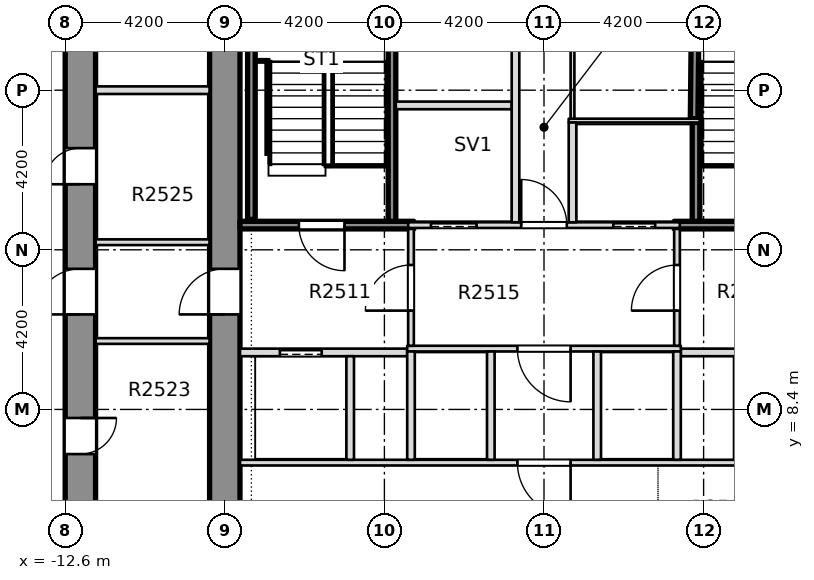
"""IFC4 building model, lengths in metres.
Left out: names, types, materials, properties, quantities, classifications, styles, units other than length and angle.
Written with IfcOpenShell. Run it as: python <this file> out.ifc"""

import sys

from ifc_helpers import new_model, si_unit, direction, frame, frame_2d, origin, place, context, subcontext, project, spatial, rectangle, extrude, element, fill, save


model = new_model("IFC4")
c1 = context("Model", 3, precision=1e-05, world=origin(), true_north=direction((0.0, 1.0)))
c2 = subcontext(c1, "Body", "Model", "MODEL_VIEW")
j1 = project(units=[si_unit("LENGTHUNIT", "METRE"), si_unit("PLANEANGLEUNIT", "RADIAN")], contexts=[c1])
p1 = place(None, origin())
s1 = spatial("IfcSite", under=j1, at=p1, CompositionType="ELEMENT")
p2 = place(p1, origin())
s2 = spatial("IfcBuilding", under=s1, at=p2, CompositionType="ELEMENT")
p3 = place(p2, frame((0.0, 0.0, 101.1)))
s3 = spatial("IfcBuildingStorey", under=s2, at=p3, CompositionType="ELEMENT", Elevation=101.1)
p4 = place(p3, frame((-12.2, -8.4, -0.32), z_axis=(0.0, 0.0, 1.0), x_axis=(0.0, 1.0, 0.0)))
e1 = element("IfcWall", 1, at=p4, inside=s3, PredefinedType="SHEAR", context=c2, shape_type="SweptSolid", body=[
    extrude(rectangle(XDim=30.15, YDim=0.8, at=frame_2d((15.075, 0.0))), origin(), (0.0, 0.0, 1.0), 3.45),
])
p5 = place(p4, frame((3.425, 0.0, 0.32)))
e2 = element("IfcOpeningElement", 2, at=p5, cuts=e1, PredefinedType="OPENING", context=c2, shape_type="SweptSolid", body=[
    extrude(rectangle(XDim=0.95, YDim=2.1, at=frame_2d((0.475, 1.05))), frame((0.0, 0.41, 0.0), z_axis=(0.0, -1.0, 0.0), x_axis=(1.0, 0.0, 0.0)), (0.0, 0.0, 1.0), 0.82),
])
p6 = place(p4, frame((8.075, 0.0, 0.32)))
e3 = element("IfcOpeningElement", 3, at=p6, cuts=e1, PredefinedType="OPENING", context=c2, shape_type="SweptSolid", body=[
    extrude(rectangle(XDim=0.95, YDim=2.1, at=frame_2d((0.475, 1.05))), frame((0.0, 0.41, 0.0), z_axis=(0.0, -1.0, 0.0), x_axis=(1.0, 0.0, 0.0)), (0.0, 0.0, 1.0), 0.82),
])
p7 = place(p4, frame((11.425, 0.0, 0.32)))
e4 = element("IfcOpeningElement", 4, at=p7, cuts=e1, PredefinedType="OPENING", context=c2, shape_type="SweptSolid", body=[
    extrude(rectangle(XDim=0.95, YDim=2.1, at=frame_2d((0.475, 1.05))), frame((0.0, 0.41, 0.0), z_axis=(0.0, -1.0, 0.0), x_axis=(1.0, 0.0, 0.0)), (0.0, 0.0, 1.0), 0.82),
])
p8 = place(p4, frame((15.625, 0.0, 0.32)))
e5 = element("IfcOpeningElement", 5, at=p8, cuts=e1, PredefinedType="OPENING", context=c2, shape_type="SweptSolid", body=[
    extrude(rectangle(XDim=0.95, YDim=2.1, at=frame_2d((0.475, 1.05))), frame((0.0, 0.41, 0.0), z_axis=(0.0, -1.0, 0.0), x_axis=(1.0, 0.0, 0.0)), (0.0, 0.0, 1.0), 0.82),
])
p9 = place(p4, frame((22.725, 0.0, 0.32)))
e6 = element("IfcOpeningElement", 6, at=p9, cuts=e1, PredefinedType="OPENING", context=c2, shape_type="SweptSolid", body=[
    extrude(rectangle(XDim=0.95, YDim=2.1, at=frame_2d((0.475, 1.05))), frame((0.0, 0.41, 0.0), z_axis=(0.0, -1.0, 0.0), x_axis=(1.0, 0.0, 0.0)), (0.0, 0.0, 1.0), 0.82),
])
p10 = place(p4, frame((26.75, 0.0, 0.32)))
e7 = element("IfcOpeningElement", 7, at=p10, cuts=e1, PredefinedType="OPENING", context=c2, shape_type="SweptSolid", body=[
    extrude(rectangle(XDim=0.95, YDim=2.1, at=frame_2d((0.475, 1.05))), frame((0.0, 0.41, 0.0), z_axis=(0.0, -1.0, 0.0), x_axis=(1.0, 0.0, 0.0)), (0.0, 0.0, 1.0), 0.82),
])
p11 = place(p4, frame((19.3, 0.0, 0.32)))
e8 = element("IfcOpeningElement", 8, at=p11, cuts=e1, PredefinedType="OPENING", context=c2, shape_type="SweptSolid", body=[
    extrude(rectangle(XDim=1.2, YDim=2.1, at=frame_2d((0.6, 1.05))), frame((0.0, 0.41, 0.0), z_axis=(0.0, -1.0, 0.0), x_axis=(1.0, 0.0, 0.0)), (0.0, 0.0, 1.0), 0.82),
])
p12 = place(p3, frame((-8.4, -7.6, -0.32), z_axis=(0.0, 0.0, 1.0), x_axis=(0.0, 1.0, 0.0)))
e9 = element("IfcWall", 9, at=p12, inside=s3, PredefinedType="SHEAR", context=c2, shape_type="SweptSolid", body=[
    extrude(rectangle(XDim=28.55, YDim=0.8, at=frame_2d((14.275, 0.0))), origin(), (0.0, 0.0, 1.0), 3.45),
])
p13 = place(p12, frame((18.5, 0.0, 0.32)))
e10 = element("IfcOpeningElement", 10, at=p13, cuts=e9, PredefinedType="OPENING", context=c2, shape_type="SweptSolid", body=[
    extrude(rectangle(XDim=1.2, YDim=2.1, at=frame_2d((0.6, 1.05))), frame((0.0, 0.41, 0.0), z_axis=(0.0, -1.0, 0.0), x_axis=(1.0, 0.0, 0.0)), (0.0, 0.0, 1.0), 0.82),
])
p14 = place(p3, frame((-7.999, 7.0, 0.0), z_axis=(0.0, 0.0, 1.0), x_axis=(1.0, 0.0, 0.0)))
e11 = element("IfcWall", 11, at=p14, inside=s3, PredefinedType="PARTITIONING", context=c2, shape_type="SweptSolid", body=[
    extrude(rectangle(XDim=15.998, YDim=0.15, at=frame_2d((7.999, 0.0))), origin(), (0.0, 0.0, 1.0), 3.13),
])
p15 = place(p14, frame((7.299, 0.0, 0.0)))
e12 = element("IfcOpeningElement", 12, at=p15, cuts=e11, PredefinedType="OPENING", context=c2, shape_type="SweptSolid", body=[
    extrude(rectangle(XDim=1.4, YDim=2.1, at=frame_2d((0.7, 1.05))), frame((0.0, 0.085, 0.0), z_axis=(0.0, -1.0, 0.0), x_axis=(1.0, 0.0, 0.0)), (0.0, 0.0, 1.0), 0.17),
])
p16 = place(p3, frame((-7.999, 9.9, 0.0), z_axis=(0.0, 0.0, 1.0), x_axis=(1.0, 0.0, 0.0)))
e13 = element("IfcWall", 13, at=p16, inside=s3, PredefinedType="PARTITIONING", context=c2, shape_type="SweptSolid", body=[
    extrude(rectangle(XDim=4.399, YDim=0.2, at=frame_2d((2.199, 0.0))), origin(), (0.0, 0.0, 1.0), 3.13),
])
p17 = place(p16, frame((1.049, 0.0, 0.0)))
e14 = element("IfcOpeningElement", 14, at=p17, cuts=e13, PredefinedType="OPENING", context=c2, shape_type="SweptSolid", body=[
    extrude(rectangle(XDim=1.1, YDim=2.1, at=frame_2d((0.55, 1.05))), frame((0.0, 0.11, 0.0), z_axis=(0.0, -1.0, 0.0), x_axis=(1.0, 0.0, 0.0)), (0.0, 0.0, 1.0), 0.22),
])
p18 = place(p3, frame((3.6, 9.9, 0.0), z_axis=(0.0, 0.0, 1.0), x_axis=(1.0, 0.0, 0.0)))
e15 = element("IfcWall", 15, at=p18, inside=s3, PredefinedType="PARTITIONING", context=c2, shape_type="SweptSolid", body=[
    extrude(rectangle(XDim=4.399, YDim=0.2, at=frame_2d((2.199, 0.0))), origin(), (0.0, 0.0, 1.0), 3.13),
])
p19 = place(p18, frame((2.25, 0.0, 0.0)))
e16 = element("IfcOpeningElement", 16, at=p19, cuts=e15, PredefinedType="OPENING", context=c2, shape_type="SweptSolid", body=[
    extrude(rectangle(XDim=1.1, YDim=2.1, at=frame_2d((0.55, 1.05))), frame((0.0, 0.11, 0.0), z_axis=(0.0, -1.0, 0.0), x_axis=(1.0, 0.0, 0.0)), (0.0, 0.0, 1.0), 0.22),
])
p20 = place(p3, frame((-3.6, 10.0, 0.0), z_axis=(0.0, 0.0, 1.0), x_axis=(1.0, 0.0, 0.0)))
e17 = element("IfcWall", 17, at=p20, inside=s3, PredefinedType="PARTITIONING", context=c2, shape_type="SweptSolid", body=[
    extrude(rectangle(XDim=7.2, YDim=0.15, at=frame_2d((3.6, 0.0))), origin(), (0.0, 0.0, 1.0), 3.13),
])
p21 = place(p20, frame((2.9, 0.0, 0.0)))
e18 = element("IfcOpeningElement", 18, at=p21, cuts=e17, PredefinedType="OPENING", context=c2, shape_type="SweptSolid", body=[
    extrude(rectangle(XDim=1.4, YDim=2.1, at=frame_2d((0.7, 1.05))), frame((0.0, 0.085, 0.0), z_axis=(0.0, -1.0, 0.0), x_axis=(1.0, 0.0, 0.0)), (0.0, 0.0, 1.0), 0.17),
])
p22 = place(p3, frame((-7.999, 13.25, 0.0), z_axis=(0.0, 0.0, 1.0), x_axis=(1.0, 0.0, 0.0)))
e19 = element("IfcWall", 19, at=p22, inside=s3, PredefinedType="SOLIDWALL", context=c2, shape_type="SweptSolid", body=[
    extrude(rectangle(XDim=4.574, YDim=0.2, at=frame_2d((2.287, 0.0))), origin(), (0.0, 0.0, 1.0), 3.13),
])
p23 = place(p22, frame((1.549, 0.0, 0.0)))
e20 = element("IfcOpeningElement", 20, at=p23, cuts=e19, PredefinedType="OPENING", context=c2, shape_type="SweptSolid", body=[
    extrude(rectangle(XDim=1.2, YDim=2.1, at=frame_2d((0.6, 1.05))), frame((0.0, 0.11, 0.0), z_axis=(0.0, -1.0, 0.0), x_axis=(1.0, 0.0, 0.0)), (0.0, 0.0, 1.0), 0.22),
])
p24 = place(p3, frame((-3.575, 13.25, 0.0), z_axis=(0.0, 0.0, 1.0), x_axis=(1.0, 0.0, 0.0)))
e21 = element("IfcWall", 21, at=p24, inside=s3, PredefinedType="PARTITIONING", context=c2, shape_type="SweptSolid", body=[
    extrude(rectangle(XDim=7.15, YDim=0.15, at=frame_2d((3.575, 0.0))), origin(), (0.0, 0.0, 1.0), 3.13),
])
p25 = place(p24, frame((0.6, 0.0, 0.0)))
e22 = element("IfcOpeningElement", 22, at=p25, cuts=e21, PredefinedType="OPENING", context=c2, shape_type="SweptSolid", body=[
    extrude(rectangle(XDim=1.2, YDim=2.1, at=frame_2d((0.6, 1.05))), frame((0.0, 0.085, 0.0), z_axis=(0.0, -1.0, 0.0), x_axis=(1.0, 0.0, 0.0)), (0.0, 0.0, 1.0), 0.17),
])
p26 = place(p24, frame((5.4, 0.0, 0.0)))
e23 = element("IfcOpeningElement", 23, at=p26, cuts=e21, PredefinedType="OPENING", context=c2, shape_type="SweptSolid", body=[
    extrude(rectangle(XDim=1.1, YDim=2.1, at=frame_2d((0.55, 1.05))), frame((0.0, 0.085, 0.0), z_axis=(0.0, -1.0, 0.0), x_axis=(1.0, 0.0, 0.0)), (0.0, 0.0, 1.0), 0.17),
])
p27 = place(p24, frame((2.975, 0.0, 0.0)))
e24 = element("IfcOpeningElement", 24, at=p27, cuts=e21, PredefinedType="OPENING", context=c2, shape_type="SweptSolid", body=[
    extrude(rectangle(XDim=1.2, YDim=2.1, at=frame_2d((0.6, 1.05))), frame((0.0, 0.085, 0.0), z_axis=(0.0, -1.0, 0.0), x_axis=(1.0, 0.0, 0.0)), (0.0, 0.0, 1.0), 0.17),
])
p28 = place(p3, frame((3.425, 13.25, 0.0), z_axis=(0.0, 0.0, 1.0), x_axis=(1.0, 0.0, 0.0)))
e25 = element("IfcWall", 25, at=p28, inside=s3, PredefinedType="SOLIDWALL", context=c2, shape_type="SweptSolid", body=[
    extrude(rectangle(XDim=4.574, YDim=0.2, at=frame_2d((2.287, 0.0))), origin(), (0.0, 0.0, 1.0), 3.13),
])
p29 = place(p28, frame((1.825, 0.0, 0.0)))
e26 = element("IfcOpeningElement", 26, at=p29, cuts=e25, PredefinedType="OPENING", context=c2, shape_type="SweptSolid", body=[
    extrude(rectangle(XDim=1.2, YDim=2.1, at=frame_2d((0.6, 1.05))), frame((0.0, 0.11, 0.0), z_axis=(0.0, -1.0, 0.0), x_axis=(1.0, 0.0, 0.0)), (0.0, 0.0, 1.0), 0.22),
])
p30 = place(p3, frame((0.65, 16.0, 0.0), z_axis=(0.0, 0.0, 1.0), x_axis=(1.0, 0.0, 0.0)))
e27 = element("IfcWall", 27, at=p30, inside=s3, PredefinedType="PARTITIONING", context=c2, shape_type="SweptSolid", body=[
    extrude(rectangle(XDim=3.45, YDim=0.1, at=frame_2d((1.725, 0.0))), origin(), (0.0, 0.0, 1.0), 3.13),
])
p31 = place(p3, frame((-3.9, 16.4, 0.0), z_axis=(0.0, 0.0, 1.0), x_axis=(1.0, 0.0, 0.0)))
e28 = element("IfcWall", 28, at=p31, inside=s3, PredefinedType="PARTITIONING", context=c2, shape_type="SweptSolid", body=[
    extrude(rectangle(XDim=3.05, YDim=0.2, at=frame_2d((1.525, 0.0))), origin(), (0.0, 0.0, 1.0), 3.13),
])
p32 = place(p3, frame((-5.1, 7.075, 0.0), z_axis=(0.0, 0.0, 1.0), x_axis=(0.0, 1.0, 0.0)))
e29 = element("IfcWall", 29, at=p32, inside=s3, PredefinedType="PARTITIONING", context=c2, shape_type="SweptSolid", body=[
    extrude(rectangle(XDim=2.725, YDim=0.2, at=frame_2d((1.363, 0.0))), origin(), (0.0, 0.0, 1.0), 3.13),
])
p33 = place(p3, frame((-4.0, 13.35, 0.0), z_axis=(0.0, 0.0, 1.0), x_axis=(0.0, 1.0, 0.0)))
e30 = element("IfcWall", 30, at=p33, inside=s3, PredefinedType="SOLIDWALL", context=c2, shape_type="SweptSolid", body=[
    extrude(rectangle(XDim=7.599, YDim=0.2, at=frame_2d((3.799, 0.0))), origin(), (0.0, 0.0, 1.0), 3.13),
])
p34 = place(p3, frame((-3.5, 7.075, 0.0), z_axis=(0.0, 0.0, 1.0), x_axis=(0.0, 1.0, 0.0)))
e31 = element("IfcWall", 31, at=p34, inside=s3, PredefinedType="PARTITIONING", context=c2, shape_type="SweptSolid", body=[
    extrude(rectangle(XDim=2.85, YDim=0.2, at=frame_2d((1.425, 0.0))), origin(), (0.0, 0.0, 1.0), 3.13),
])
p35 = place(p3, frame((-3.5, 10.075, 0.0), z_axis=(0.0, 0.0, 1.0), x_axis=(0.0, 1.0, 0.0)))
e32 = element("IfcWall", 32, at=p35, inside=s3, PredefinedType="PARTITIONING", context=c2, shape_type="SweptSolid", body=[
    extrude(rectangle(XDim=3.075, YDim=0.15, at=frame_2d((1.538, 0.0))), origin(), (0.0, 0.0, 1.0), 3.13),
])
p36 = place(p35, frame((0.925, 0.0, 0.0)))
e33 = element("IfcOpeningElement", 33, at=p36, cuts=e32, PredefinedType="OPENING", context=c2, shape_type="SweptSolid", body=[
    extrude(rectangle(XDim=1.2, YDim=2.1, at=frame_2d((0.6, 1.05))), frame((0.0, 0.085, 0.0), z_axis=(0.0, -1.0, 0.0), x_axis=(1.0, 0.0, 0.0)), (0.0, 0.0, 1.0), 0.17),
])
p37 = place(p3, frame((-1.4, 7.075, 0.0), z_axis=(0.0, 0.0, 1.0), x_axis=(0.0, 1.0, 0.0)))
e34 = element("IfcWall", 34, at=p37, inside=s3, PredefinedType="PARTITIONING", context=c2, shape_type="SweptSolid", body=[
    extrude(rectangle(XDim=2.85, YDim=0.2, at=frame_2d((1.425, 0.0))), origin(), (0.0, 0.0, 1.0), 3.13),
])
p38 = place(p3, frame((-0.75, 13.325, 0.0), z_axis=(0.0, 0.0, 1.0), x_axis=(0.0, 1.0, 0.0)))
e35 = element("IfcWall", 35, at=p38, inside=s3, PredefinedType="PARTITIONING", context=c2, shape_type="SweptSolid", body=[
    extrude(rectangle(XDim=7.624, YDim=0.2, at=frame_2d((3.812, 0.0))), origin(), (0.0, 0.0, 1.0), 3.13),
])
p39 = place(p38, frame((4.8, 0.0, 0.0)))
e36 = element("IfcOpeningElement", 36, at=p39, cuts=e35, PredefinedType="OPENING", context=c2, shape_type="SweptSolid", body=[
    extrude(rectangle(XDim=0.95, YDim=2.1, at=frame_2d((0.475, 1.05))), frame((0.0, 0.11, 0.0), z_axis=(0.0, -1.0, 0.0), x_axis=(1.0, 0.0, 0.0)), (0.0, 0.0, 1.0), 0.22),
])
p40 = place(p3, frame((0.75, 13.325, 0.0), z_axis=(0.0, 0.0, 1.0), x_axis=(0.0, 1.0, 0.0)))
e37 = element("IfcWall", 37, at=p40, inside=s3, PredefinedType="PARTITIONING", context=c2, shape_type="SweptSolid", body=[
    extrude(rectangle(XDim=2.625, YDim=0.2, at=frame_2d((1.312, 0.0))), origin(), (0.0, 0.0, 1.0), 3.13),
])
p41 = place(p3, frame((0.75, 16.05, 0.0), z_axis=(0.0, 0.0, 1.0), x_axis=(0.0, 1.0, 0.0)))
e38 = element("IfcWall", 38, at=p41, inside=s3, PredefinedType="PARTITIONING", context=c2, shape_type="SweptSolid", body=[
    extrude(rectangle(XDim=4.899, YDim=0.1, at=frame_2d((2.449, 0.0))), origin(), (0.0, 0.0, 1.0), 3.13),
])
p42 = place(p41, frame((1.875, 0.0, 0.0)))
e39 = element("IfcOpeningElement", 39, at=p42, cuts=e38, PredefinedType="OPENING", context=c2, shape_type="SweptSolid", body=[
    extrude(rectangle(XDim=0.95, YDim=2.1, at=frame_2d((0.475, 1.05))), frame((0.0, 0.06, 0.0), z_axis=(0.0, -1.0, 0.0), x_axis=(1.0, 0.0, 0.0)), (0.0, 0.0, 1.0), 0.12),
])
for number, where, z_axis, x_axis in (
    (40, (1.4, 7.075, 0.0), (0.0, 0.0, 1.0), (0.0, 1.0, 0.0)),
    (41, (3.5, 7.075, 0.0), (0.0, 0.0, 1.0), (0.0, 1.0, 0.0)),
):
    element("IfcWall", number, at=place(p3, frame(where, z_axis=z_axis, x_axis=x_axis)), inside=s3, PredefinedType="PARTITIONING", context=c2, shape_type="SweptSolid", body=[
        extrude(rectangle(XDim=2.85, YDim=0.2, at=frame_2d((1.425, 0.0))), origin(), (0.0, 0.0, 1.0), 3.13),
    ])
p43 = place(p3, frame((3.5, 10.075, 0.0), z_axis=(0.0, 0.0, 1.0), x_axis=(0.0, 1.0, 0.0)))
e42 = element("IfcWall", 42, at=p43, inside=s3, PredefinedType="PARTITIONING", context=c2, shape_type="SweptSolid", body=[
    extrude(rectangle(XDim=3.075, YDim=0.15, at=frame_2d((1.538, 0.0))), origin(), (0.0, 0.0, 1.0), 3.13),
])
p44 = place(p43, frame((0.925, 0.0, 0.0)))
e43 = element("IfcOpeningElement", 43, at=p44, cuts=e42, PredefinedType="OPENING", context=c2, shape_type="SweptSolid", body=[
    extrude(rectangle(XDim=1.2, YDim=2.1, at=frame_2d((0.6, 1.05))), frame((0.0, 0.085, 0.0), z_axis=(0.0, -1.0, 0.0), x_axis=(1.0, 0.0, 0.0)), (0.0, 0.0, 1.0), 0.17),
])
p45 = place(p3, frame((4.0, 13.35, 0.0), z_axis=(0.0, 0.0, 1.0), x_axis=(0.0, 1.0, 0.0)))
e44 = element("IfcWall", 44, at=p45, inside=s3, PredefinedType="SOLIDWALL", context=c2, shape_type="SweptSolid", body=[
    extrude(rectangle(XDim=2.6, YDim=0.2, at=frame_2d((1.3, 0.0))), origin(), (0.0, 0.0, 1.0), 3.13),
])
p46 = place(p3, frame((3.95, 16.05, 0.0), z_axis=(0.0, 0.0, 1.0), x_axis=(0.01032118628, 0.999946735138, 0.0)))
e45 = element("IfcWall", 45, at=p46, inside=s3, PredefinedType="SOLIDWALL", context=c2, shape_type="SweptSolid", body=[
    extrude(rectangle(XDim=4.849, YDim=0.2, at=frame_2d((2.425, 0.0))), origin(), (0.0, 0.0, 1.0), 3.13),
])
for number, where, z_axis, x_axis in (
    (46, (-11.799, 10.2, 0.0), (0.0, 0.0, 1.0), (1.0, 0.0, 0.0)),
    (47, (-11.799, 12.8, 0.0), (0.0, 0.0, 1.0), (1.0, 0.0, 0.0)),
):
    element("IfcWall", number, at=place(p3, frame(where, z_axis=z_axis, x_axis=x_axis)), inside=s3, PredefinedType="PARTITIONING", context=c2, shape_type="SweptSolid", body=[
        extrude(rectangle(XDim=2.998, YDim=0.15, at=frame_2d((1.499, 0.0))), origin(), (0.0, 0.0, 1.0), 3.13),
    ])
p47 = place(p3, frame((-11.799, 16.8, 0.0), z_axis=(0.0, 0.0, 1.0), x_axis=(1.0, 0.0, 0.0)))
e48 = element("IfcWall", 48, at=p47, inside=s3, PredefinedType="PARTITIONING", context=c2, shape_type="SweptSolid", body=[
    extrude(rectangle(XDim=2.998, YDim=0.2, at=frame_2d((1.499, 0.0))), origin(), (0.0, 0.0, 1.0), 3.13),
])
p48 = place(p3, frame((-7.7, 13.4, 0.0), z_axis=(0.0, 0.0, 1.0), x_axis=(0.0, 1.0, 0.0)))
e49 = element("IfcWall", 49, at=p48, inside=s3, PredefinedType="SOLIDWALL", context=c2, shape_type="SweptSolid", body=[
    extrude(rectangle(XDim=7.45, YDim=0.2, at=frame_2d((3.725, 0.0))), origin(), (0.0, 0.0, 1.0), 3.13),
])
p49 = place(p23, origin())
e50 = element("IfcDoor", 50, at=p49, inside=s3, OperationType="SINGLE_SWING_LEFT", PredefinedType="DOOR", context=c2, shape_type="SweptSolid", body=[
    extrude(rectangle(XDim=1.2, YDim=2.1, at=frame_2d((0.6, 1.05))), frame((0.0, 0.025, 0.0), z_axis=(0.0, -1.0, 0.0), x_axis=(1.0, 0.0, 0.0)), (0.0, 0.0, 1.0), 0.05),
])
fill(e20, e50)
p50 = place(p17, origin())
e51 = element("IfcDoor", 51, at=p50, inside=s3, OperationType="SLIDING_TO_LEFT", PredefinedType="DOOR", context=c2, shape_type="SweptSolid", body=[
    extrude(rectangle(XDim=1.1, YDim=2.1, at=frame_2d((0.55, 1.05))), frame((0.0, 0.025, 0.0), z_axis=(0.0, -1.0, 0.0), x_axis=(1.0, 0.0, 0.0)), (0.0, 0.0, 1.0), 0.05),
])
fill(e14, e51)
p51 = place(p15, origin())
e52 = element("IfcDoor", 52, at=p51, inside=s3, OperationType="SINGLE_SWING_RIGHT", PredefinedType="DOOR", context=c2, shape_type="SweptSolid", body=[
    extrude(rectangle(XDim=1.4, YDim=2.1, at=frame_2d((0.7, 1.05))), frame((0.0, 0.025, 0.0), z_axis=(0.0, -1.0, 0.0), x_axis=(1.0, 0.0, 0.0)), (0.0, 0.0, 1.0), 0.05),
])
fill(e12, e52)
p52 = place(p21, origin())
e53 = element("IfcDoor", 53, at=p52, inside=s3, OperationType="SINGLE_SWING_RIGHT", PredefinedType="DOOR", context=c2, shape_type="SweptSolid", body=[
    extrude(rectangle(XDim=1.4, YDim=2.1, at=frame_2d((0.7, 1.05))), frame((0.0, 0.025, 0.0), z_axis=(0.0, -1.0, 0.0), x_axis=(1.0, 0.0, 0.0)), (0.0, 0.0, 1.0), 0.05),
])
fill(e18, e53)
p53 = place(p25, origin())
e54 = element("IfcDoor", 54, at=p53, inside=s3, OperationType="SLIDING_TO_RIGHT", PredefinedType="DOOR", context=c2, shape_type="SweptSolid", body=[
    extrude(rectangle(XDim=1.2, YDim=2.1, at=frame_2d((0.6, 1.05))), frame((0.0, 0.025, 0.0), z_axis=(0.0, -1.0, 0.0), x_axis=(1.0, 0.0, 0.0)), (0.0, 0.0, 1.0), 0.05),
])
fill(e22, e54)
p54 = place(p26, origin())
e55 = element("IfcDoor", 55, at=p54, inside=s3, OperationType="SLIDING_TO_LEFT", PredefinedType="DOOR", context=c2, shape_type="SweptSolid", body=[
    extrude(rectangle(XDim=1.1, YDim=2.1, at=frame_2d((0.55, 1.05))), frame((0.0, 0.025, 0.0), z_axis=(0.0, -1.0, 0.0), x_axis=(1.0, 0.0, 0.0)), (0.0, 0.0, 1.0), 0.05),
])
fill(e23, e55)
p55 = place(p27, origin())
e56 = element("IfcDoor", 56, at=p55, inside=s3, OperationType="SINGLE_SWING_RIGHT", PredefinedType="DOOR", context=c2, shape_type="SweptSolid", body=[
    extrude(rectangle(XDim=1.2, YDim=2.1, at=frame_2d((0.6, 1.05))), frame((0.0, 0.025, 0.0), z_axis=(0.0, -1.0, 0.0), x_axis=(1.0, 0.0, 0.0)), (0.0, 0.0, 1.0), 0.05),
])
fill(e24, e56)
p56 = place(p36, origin())
e57 = element("IfcDoor", 57, at=p56, inside=s3, OperationType="SINGLE_SWING_RIGHT", PredefinedType="DOOR", context=c2, shape_type="SweptSolid", body=[
    extrude(rectangle(XDim=1.2, YDim=2.1, at=frame_2d((0.6, 1.05))), frame((0.0, 0.025, 0.0), z_axis=(0.0, -1.0, 0.0), x_axis=(1.0, 0.0, 0.0)), (0.0, 0.0, 1.0), 0.05),
])
fill(e33, e57)
p57 = place(p44, origin())
e58 = element("IfcDoor", 58, at=p57, inside=s3, OperationType="SINGLE_SWING_LEFT", PredefinedType="DOOR", context=c2, shape_type="SweptSolid", body=[
    extrude(rectangle(XDim=1.2, YDim=2.1, at=frame_2d((0.6, 1.05))), frame((0.0, 0.025, 0.0), z_axis=(0.0, -1.0, 0.0), x_axis=(1.0, 0.0, 0.0)), (0.0, 0.0, 1.0), 0.05),
])
fill(e43, e58)
p58 = place(p8, origin())
e59 = element("IfcDoor", 59, at=p58, inside=s3, OperationType="SINGLE_SWING_LEFT", PredefinedType="DOOR", context=c2, shape_type="SweptSolid", body=[
    extrude(rectangle(XDim=0.95, YDim=2.1, at=frame_2d((0.475, 1.05))), frame((0.0, 0.025, 0.0), z_axis=(0.0, -1.0, 0.0), x_axis=(1.0, 0.0, 0.0)), (0.0, 0.0, 1.0), 0.05),
])
fill(e5, e59)
p59 = place(p9, origin())
e60 = element("IfcDoor", 60, at=p59, inside=s3, OperationType="SINGLE_SWING_LEFT", PredefinedType="DOOR", context=c2, shape_type="SweptSolid", body=[
    extrude(rectangle(XDim=0.95, YDim=2.1, at=frame_2d((0.475, 1.05))), frame((0.0, 0.025, 0.0), z_axis=(0.0, -1.0, 0.0), x_axis=(1.0, 0.0, 0.0)), (0.0, 0.0, 1.0), 0.05),
])
fill(e6, e60)
p60 = place(p11, origin())
e61 = element("IfcDoor", 61, at=p60, inside=s3, OperationType="SINGLE_SWING_LEFT", PredefinedType="DOOR", context=c2, shape_type="SweptSolid", body=[
    extrude(rectangle(XDim=1.2, YDim=2.1, at=frame_2d((0.6, 1.05))), frame((0.0, 0.025, 0.0), z_axis=(0.0, -1.0, 0.0), x_axis=(1.0, 0.0, 0.0)), (0.0, 0.0, 1.0), 0.05),
])
fill(e8, e61)
p61 = place(p13, origin())
e62 = element("IfcDoor", 62, at=p61, inside=s3, OperationType="SINGLE_SWING_LEFT", PredefinedType="DOOR", context=c2, shape_type="SweptSolid", body=[
    extrude(rectangle(XDim=1.2, YDim=2.1, at=frame_2d((0.6, 1.05))), frame((0.0, 0.025, 0.0), z_axis=(0.0, -1.0, 0.0), x_axis=(1.0, 0.0, 0.0)), (0.0, 0.0, 1.0), 0.05),
])
fill(e10, e62)
save(model, sys.argv[1])
